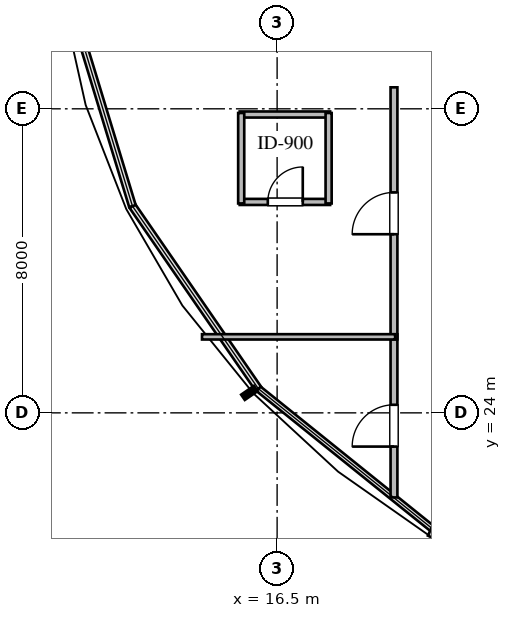
"""IFC4 building model, lengths in metres.
Left out: names, types, materials, properties, quantities, classifications, styles, units other than length and angle.
Written with IfcOpenShell. Run it as: python <this file> out.ifc"""

import sys

from ifc_helpers import new_model, si_unit, direction, frame, frame_2d, origin, place, context, subcontext, project, spatial, rectangle, extrude, element, fill, save


model = new_model("IFC4")
c1 = context("Model", 3, precision=1e-05, world=origin(), true_north=direction((0.0, 1.0)))
c2 = subcontext(c1, "Body", "Model", "MODEL_VIEW")
j1 = project(units=[si_unit("LENGTHUNIT", "METRE"), si_unit("PLANEANGLEUNIT", "RADIAN")], contexts=[c1])
p1 = place(None, origin())
s1 = spatial("IfcSite", under=j1, at=p1, CompositionType="ELEMENT")
p2 = place(p1, origin())
s2 = spatial("IfcBuilding", under=s1, at=p2, CompositionType="ELEMENT")
p3 = place(p2, frame((0.0, 0.0, 174.6)))
s3 = spatial("IfcBuildingStorey", under=s2, at=p3, CompositionType="ELEMENT", Elevation=174.6)
p4 = place(p3, frame((26.994, 17.88, 0.0), z_axis=(0.0, 0.0, 1.0), x_axis=(-0.905106920297, 0.425184034073, 0.0)))
e1 = element("IfcWall", 1, at=p4, inside=s3, PredefinedType="STANDARD", context=c2, shape_type="SweptSolid", body=[
    extrude(rectangle(XDim=7.136, YDim=0.32, at=frame_2d((3.568, 0.0))), origin(), (0.0, 0.0, 1.0), 2.657),
])
p5 = place(p3, frame((15.515, 29.55, 0.0), z_axis=(0.0, 0.0, 1.0), x_axis=(1.0, 0.0, 0.0)))
e2 = element("IfcWall", 2, at=p5, inside=s3, PredefinedType="PLUMBINGWALL", context=c2, shape_type="SweptSolid", body=[
    extrude(rectangle(XDim=2.38, YDim=0.16, at=frame_2d((1.19, 0.0))), origin(), (0.0, 0.0, 1.0), 3.36),
])
p6 = place(p5, frame((0.74, 0.0, 0.0)))
e3 = element("IfcOpeningElement", 3, at=p6, cuts=e2, PredefinedType="OPENING", context=c2, shape_type="SweptSolid", body=[
    extrude(rectangle(XDim=0.92, YDim=2.1, at=frame_2d((0.46, 1.05))), frame((0.0, 0.09, 0.0), z_axis=(0.0, -1.0, 0.0), x_axis=(1.0, 0.0, 0.0)), (0.0, 0.0, 1.0), 0.18),
])
p7 = place(p3, frame((15.515, 31.85, 0.0), z_axis=(0.0, 0.0, 1.0), x_axis=(1.0, 0.0, 0.0)))
e4 = element("IfcWall", 4, at=p7, inside=s3, PredefinedType="PLUMBINGWALL", context=c2, shape_type="SweptSolid", body=[
    extrude(rectangle(XDim=2.38, YDim=0.16, at=frame_2d((1.19, 0.0))), origin(), (0.0, 0.0, 1.0), 3.36),
])
for number, where, z_axis, x_axis in (
    (5, (15.555, 29.51, 0.0), (0.0, 0.0, 1.0), (0.0, 1.0, 0.0)),
    (6, (17.855, 29.51, 0.0), (0.0, 0.0, 1.0), (0.0, 1.0, 0.0)),
):
    element("IfcWall", number, at=place(p3, frame(where, z_axis=z_axis, x_axis=x_axis)), inside=s3, PredefinedType="PLUMBINGWALL", context=c2, shape_type="SweptSolid", body=[
        extrude(rectangle(XDim=2.38, YDim=0.16, at=frame_2d((1.19, 0.0))), origin(), (0.0, 0.0, 1.0), 3.36),
    ])
p8 = place(p3, frame((19.575, 21.775, 0.0), z_axis=(0.0, 0.0, 1.0), x_axis=(0.0, 1.0, 0.0)))
e7 = element("IfcWall", 7, at=p8, inside=s3, PredefinedType="PARTITIONING", context=c2, shape_type="SweptSolid", body=[
    extrude(rectangle(XDim=4.29, YDim=0.18, at=frame_2d((2.145, 0.0))), origin(), (0.0, 0.0, 1.0), 3.36),
])
p9 = place(p8, frame((1.338, 0.0, 0.0)))
e8 = element("IfcOpeningElement", 8, at=p9, cuts=e7, PredefinedType="OPENING", context=c2, shape_type="SweptSolid", body=[
    extrude(rectangle(XDim=1.1, YDim=2.1, at=frame_2d((0.55, 1.05))), frame((0.0, 0.1, 0.0), z_axis=(0.0, -1.0, 0.0), x_axis=(1.0, 0.0, 0.0)), (0.0, 0.0, 1.0), 0.2),
])
p10 = place(p3, frame((19.575, 25.935, 0.0), z_axis=(0.0, 0.0, 1.0), x_axis=(0.0, 1.0, 0.0)))
e9 = element("IfcWall", 9, at=p10, inside=s3, PredefinedType="PARTITIONING", context=c2, shape_type="SweptSolid", body=[
    extrude(rectangle(XDim=6.63, YDim=0.18, at=frame_2d((3.315, 0.0))), origin(), (0.0, 0.0, 1.0), 2.657),
])
p11 = place(p10, frame((2.765, 0.0, 0.0)))
e10 = element("IfcOpeningElement", 10, at=p11, cuts=e9, PredefinedType="OPENING", context=c2, shape_type="SweptSolid", body=[
    extrude(rectangle(XDim=1.1, YDim=2.1, at=frame_2d((0.55, 1.05))), frame((0.0, 0.1, 0.0), z_axis=(0.0, -1.0, 0.0), x_axis=(1.0, 0.0, 0.0)), (0.0, 0.0, 1.0), 0.2),
])
p12 = place(p3, frame((14.524, 26.0, 0.0), z_axis=(0.0, 0.0, 1.0), x_axis=(1.0, 0.0, 0.0)))
e11 = element("IfcWall", 11, at=p12, inside=s3, PredefinedType="PARTITIONING", context=c2, shape_type="SweptSolid", body=[
    extrude(rectangle(XDim=5.081, YDim=0.14, at=frame_2d((2.541, 0.0))), origin(), (0.0, 0.0, 1.0), 3.36),
])
p13 = place(p6, origin())
e12 = element("IfcDoor", 12, at=p13, inside=s3, OperationType="SINGLE_SWING_RIGHT", PredefinedType="DOOR", context=c2, shape_type="SweptSolid", body=[
    extrude(rectangle(XDim=0.92, YDim=2.1, at=frame_2d((0.46, 1.05))), frame((0.0, 0.025, 0.0), z_axis=(0.0, -1.0, 0.0), x_axis=(1.0, 0.0, 0.0)), (0.0, 0.0, 1.0), 0.05),
])
fill(e3, e12)
p14 = place(p9, origin())
e13 = element("IfcDoor", 13, at=p14, inside=s3, OperationType="SINGLE_SWING_LEFT", PredefinedType="DOOR", context=c2, shape_type="SweptSolid", body=[
    extrude(rectangle(XDim=1.1, YDim=2.1, at=frame_2d((0.55, 1.05))), frame((0.0, 0.025, 0.0), z_axis=(0.0, -1.0, 0.0), x_axis=(1.0, 0.0, 0.0)), (0.0, 0.0, 1.0), 0.05),
])
fill(e8, e13)
p15 = place(p11, origin())
e14 = element("IfcDoor", 14, at=p15, inside=s3, OperationType="SINGLE_SWING_LEFT", PredefinedType="DOOR", context=c2, shape_type="SweptSolid", body=[
    extrude(rectangle(XDim=1.1, YDim=2.1, at=frame_2d((0.55, 1.05))), frame((0.0, 0.025, 0.0), z_axis=(0.0, -1.0, 0.0), x_axis=(1.0, 0.0, 0.0)), (0.0, 0.0, 1.0), 0.05),
])
fill(e10, e14)
save(model, sys.argv[1])
